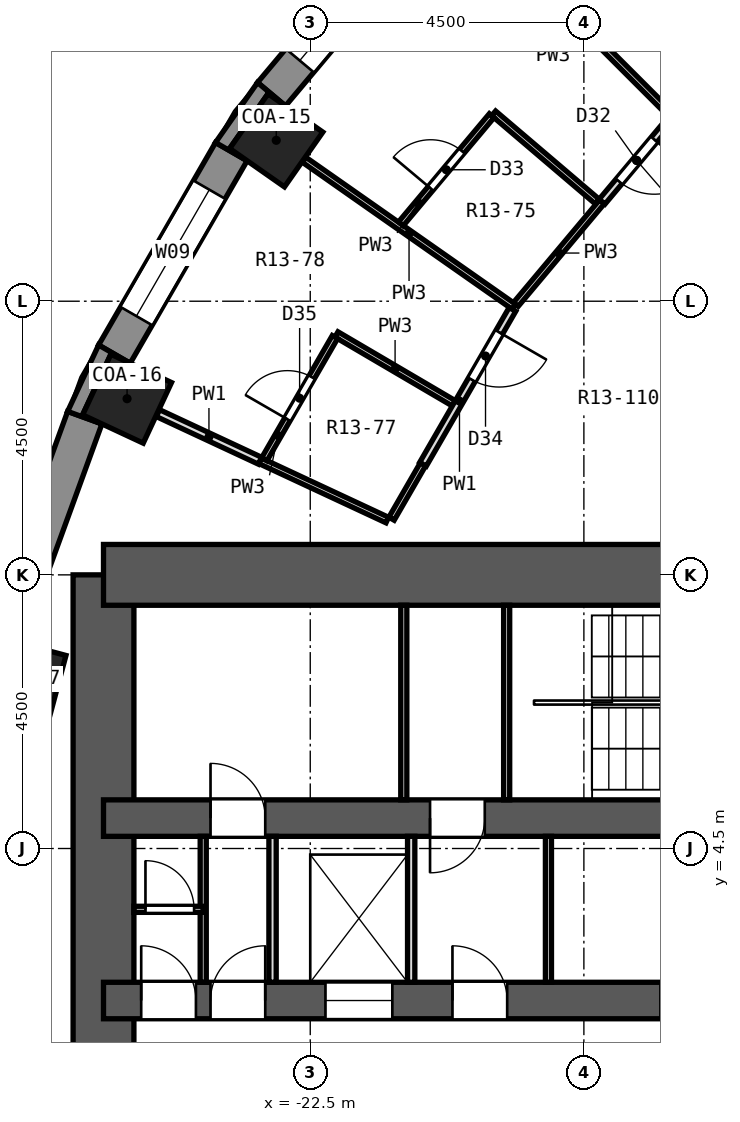
"""IFC4 building model, lengths in metres.
Left out: names, types, materials, properties, quantities, classifications, styles, units other than length and angle.
Written with IfcOpenShell. Run it as: python <this file> out.ifc"""

import sys

from ifc_helpers import new_model, si_unit, direction, frame, frame_2d, origin, origin_2d, place, context, subcontext, project, spatial, polyline, rectangle, outline, extrude, element, fill, save


model = new_model("IFC4")
c1 = context("Model", 3, precision=1e-05, world=origin(), true_north=direction((0.0, 1.0)))
c2 = subcontext(c1, "Body", "Model", "MODEL_VIEW")
j1 = project(units=[si_unit("LENGTHUNIT", "METRE"), si_unit("PLANEANGLEUNIT", "RADIAN")], contexts=[c1])
p1 = place(None, origin())
s1 = spatial("IfcSite", under=j1, at=p1, CompositionType="ELEMENT")
p2 = place(p1, origin())
s2 = spatial("IfcBuilding", under=s1, at=p2, CompositionType="ELEMENT")
p3 = place(p2, frame((0.0, 0.0, 65.9)))
s3 = spatial("IfcBuildingStorey", under=s2, at=p3, CompositionType="ELEMENT", Elevation=65.9)
for number, where, z_axis, x_axis in (
    (1, (-23.059, 16.146, 0.0), (0.0, 0.0, 1.0), (-0.819, 0.574, 0.0)),
    (2, (-25.512, 11.897, 0.0), (0.0, 0.0, 1.0), (-0.906, 0.423, 0.0)),
    (3, (-27.191, 7.286, 0.0), (0.0, 0.0, 1.0), (-0.966, 0.259, 0.0)),
):
    element("IfcColumn", number, at=place(p3, frame(where, z_axis=z_axis, x_axis=x_axis)), inside=s3, PredefinedType="COLUMN", context=c2, shape_type="SweptSolid", body=[
        extrude(rectangle(XDim=1.1, YDim=1.1, at=origin_2d()), origin(), (0.0, 0.0, 1.0), 3.3),
    ])
p4 = place(p3, frame((-25.9, -9.0, 0.0), z_axis=(0.0, 0.0, 1.0), x_axis=(0.0, 1.0, 0.0)))
e4 = element("IfcWall", 4, at=p4, inside=s3, PredefinedType="SHEAR", context=c2, shape_type="SweptSolid", body=[
    extrude(rectangle(XDim=18.0, YDim=1.0, at=frame_2d((9.0, 0.0))), origin(), (0.0, 0.0, 1.0), 3.3),
])
p5 = place(p3, frame((-13.5, 9.0, 0.0), z_axis=(0.0, 0.0, 1.0), x_axis=(-1.0, 0.0, 0.0)))
e5 = element("IfcWall", 5, at=p5, inside=s3, PredefinedType="SHEAR", context=c2, shape_type="SweptSolid", body=[
    extrude(rectangle(XDim=12.4, YDim=1.0, at=frame_2d((6.2, 0.0))), origin(), (0.0, 0.0, 1.0), 3.3),
])
p6 = place(p3, frame((-13.5, 5.0, 0.0), z_axis=(0.0, 0.0, 1.0), x_axis=(-1.0, 0.0, 0.0)))
e6 = element("IfcWall", 6, at=p6, inside=s3, PredefinedType="SHEAR", context=c2, shape_type="SweptSolid", body=[
    extrude(rectangle(XDim=12.4, YDim=0.6, at=frame_2d((6.2, 0.0))), origin(), (0.0, 0.0, 1.0), 3.3),
])
p7 = place(p6, frame((6.13, 0.0, 0.0)))
e7 = element("IfcOpeningElement", 7, at=p7, cuts=e6, PredefinedType="OPENING", context=c2, shape_type="SweptSolid", body=[
    extrude(rectangle(XDim=0.9, YDim=2.1, at=frame_2d((0.45, 1.05))), frame((0.0, 0.312, 0.0), z_axis=(0.0, -1.0, 0.0), x_axis=(1.0, 0.0, 0.0)), (0.0, 0.0, 1.0), 0.624),
])
p8 = place(p6, frame((9.74, 0.0, 0.0)))
e8 = element("IfcOpeningElement", 8, at=p8, cuts=e6, PredefinedType="OPENING", context=c2, shape_type="SweptSolid", body=[
    extrude(rectangle(XDim=0.9, YDim=2.1, at=frame_2d((0.45, 1.05))), frame((0.0, 0.312, 0.0), z_axis=(0.0, -1.0, 0.0), x_axis=(1.0, 0.0, 0.0)), (0.0, 0.0, 1.0), 0.624),
])
p9 = place(p3, frame((-13.5, 2.0, 0.0), z_axis=(0.0, 0.0, 1.0), x_axis=(-1.0, 0.0, 0.0)))
e9 = element("IfcWall", 9, at=p9, inside=s3, PredefinedType="SHEAR", context=c2, shape_type="SweptSolid", body=[
    extrude(rectangle(XDim=12.4, YDim=0.6, at=frame_2d((6.2, 0.0))), origin(), (0.0, 0.0, 1.0), 3.3),
])
p10 = place(p9, frame((7.65, 0.0, 0.0)))
e10 = element("IfcOpeningElement", 10, at=p10, cuts=e9, PredefinedType="OPENING", context=c2, shape_type="SweptSolid", body=[
    extrude(rectangle(XDim=1.1, YDim=2.1, at=frame_2d((0.55, 1.05))), frame((0.0, 0.312, 0.0), z_axis=(0.0, -1.0, 0.0), x_axis=(1.0, 0.0, 0.0)), (0.0, 0.0, 1.0), 0.624),
])
p11 = place(p9, frame((2.341, 0.0, 0.0)))
e11 = element("IfcOpeningElement", 11, at=p11, cuts=e9, PredefinedType="OPENING", context=c2, shape_type="SweptSolid", body=[
    extrude(rectangle(XDim=0.9, YDim=2.1, at=frame_2d((0.45, 1.05))), frame((0.0, 0.312, 0.0), z_axis=(0.0, -1.0, 0.0), x_axis=(1.0, 0.0, 0.0)), (0.0, 0.0, 1.0), 0.624),
])
p12 = place(p9, frame((5.761, 0.0, 0.0)))
e12 = element("IfcOpeningElement", 12, at=p12, cuts=e9, PredefinedType="OPENING", context=c2, shape_type="SweptSolid", body=[
    extrude(rectangle(XDim=0.9, YDim=2.1, at=frame_2d((0.45, 1.05))), frame((0.0, 0.312, 0.0), z_axis=(0.0, -1.0, 0.0), x_axis=(1.0, 0.0, 0.0)), (0.0, 0.0, 1.0), 0.624),
])
p13 = place(p9, frame((9.74, 0.0, 0.0)))
e13 = element("IfcOpeningElement", 13, at=p13, cuts=e9, PredefinedType="OPENING", context=c2, shape_type="SweptSolid", body=[
    extrude(rectangle(XDim=0.9, YDim=2.1, at=frame_2d((0.45, 1.05))), frame((0.0, 0.312, 0.0), z_axis=(0.0, -1.0, 0.0), x_axis=(1.0, 0.0, 0.0)), (0.0, 0.0, 1.0), 0.624),
])
p14 = place(p9, frame((10.88, 0.0, 0.0)))
e14 = element("IfcOpeningElement", 14, at=p14, cuts=e9, PredefinedType="OPENING", context=c2, shape_type="SweptSolid", body=[
    extrude(rectangle(XDim=0.9, YDim=2.1, at=frame_2d((0.45, 1.05))), frame((0.0, 0.312, 0.0), z_axis=(0.0, -1.0, 0.0), x_axis=(1.0, 0.0, 0.0)), (0.0, 0.0, 1.0), 0.624),
])
p15 = place(p3, frame((-20.665, 19.85, 0.0), z_axis=(0.0, 0.0, 1.0), x_axis=(-0.642809392687, -0.766026164483, 0.0)))
e15 = element("IfcWall", 15, at=p15, inside=s3, PredefinedType="SOLIDWALL", context=c2, shape_type="SweptSolid", body=[
    extrude(rectangle(XDim=3.846, YDim=0.6, at=frame_2d((1.923, 0.0))), origin(), (0.0, 0.0, 1.0), 2.75),
])
p16 = place(p15, frame((0.723, 0.0, 0.9)))
e16 = element("IfcOpeningElement", 16, at=p16, cuts=e15, PredefinedType="OPENING", context=c2, shape_type="SweptSolid", body=[
    extrude(rectangle(XDim=2.4, YDim=1.8, at=frame_2d((1.2, 0.9))), frame((0.0, 0.312, 0.0), z_axis=(0.0, -1.0, 0.0), x_axis=(1.0, 0.0, 0.0)), (0.0, 0.0, 1.0), 0.624),
])
p17 = place(p3, frame((-23.798, 15.96, 0.0), z_axis=(0.0, 0.0, 1.0), x_axis=(-0.499989888488, -0.86603124159, 0.0)))
e17 = element("IfcWall", 17, at=p17, inside=s3, PredefinedType="SOLIDWALL", context=c2, shape_type="SweptSolid", body=[
    extrude(rectangle(XDim=3.846, YDim=0.6, at=frame_2d((1.923, 0.0))), origin(), (0.0, 0.0, 1.0), 2.75),
])
p18 = place(p17, frame((0.723, 0.0, 0.9)))
e18 = element("IfcOpeningElement", 18, at=p18, cuts=e17, PredefinedType="OPENING", context=c2, shape_type="SweptSolid", body=[
    extrude(rectangle(XDim=2.4, YDim=1.8, at=frame_2d((1.2, 0.9))), frame((0.0, 0.312, 0.0), z_axis=(0.0, -1.0, 0.0), x_axis=(1.0, 0.0, 0.0)), (0.0, 0.0, 1.0), 0.624),
])
p19 = place(p3, frame((-26.208, 11.585, 0.0), z_axis=(0.0, 0.0, 1.0), x_axis=(-0.342028474173, -0.939689588564, 0.0)))
e19 = element("IfcWall", 19, at=p19, inside=s3, PredefinedType="SOLIDWALL", context=c2, shape_type="SweptSolid", body=[
    extrude(rectangle(XDim=3.846, YDim=0.6, at=frame_2d((1.923, 0.0))), origin(), (0.0, 0.0, 1.0), 2.75),
])
p20 = place(p3, origin())
e20 = element("IfcWall", 20, at=p20, inside=s3, PredefinedType="SOLIDWALL", context=c2, shape_type="SweptSolid", body=[
    extrude(outline(polyline([(-23.367, 17.097), (-24.058, 16.11), (-23.538, 15.81), (-23.825, 16.011), (-23.194, 16.912), (-22.907, 16.711), (-23.367, 17.097)])), origin(), (0.0, 0.0, 1.0), 2.75),
])
p21 = place(p3, origin())
e21 = element("IfcWall", 21, at=p21, inside=s3, PredefinedType="SOLIDWALL", context=c2, shape_type="SweptSolid", body=[
    extrude(outline(polyline([(-26.49, 11.688), (-25.926, 11.483), (-26.243, 11.631), (-25.779, 12.628), (-25.461, 12.479), (-25.981, 12.78), (-26.49, 11.688)])), origin(), (0.0, 0.0, 1.0), 2.75),
])
p22 = place(p3, frame((-19.509, 19.509, 0.0), z_axis=(0.0, 0.0, 1.0), x_axis=(0.707106781187, -0.707106781187, 0.0)))
e22 = element("IfcWall", 22, at=p22, inside=s3, PredefinedType="PARTITIONING", context=c2, shape_type="SweptSolid", body=[
    extrude(rectangle(XDim=4.212, YDim=0.1, at=frame_2d((2.106, 0.0))), origin(), (0.0, 0.0, 1.0), 2.75),
])
p23 = place(p3, frame((-19.484, 16.59, 0.0), z_axis=(0.0, 0.0, 1.0), x_axis=(0.761325032224, -0.648370415201, 0.0)))
e23 = element("IfcWall", 23, at=p23, inside=s3, PredefinedType="PARTITIONING", context=c2, shape_type="SweptSolid", body=[
    extrude(rectangle(XDim=2.237, YDim=0.1, at=frame_2d((1.119, 0.0))), origin(), (0.0, 0.0, 1.0), 2.75),
])
p24 = place(p3, frame((-22.6, 15.826, 0.0), z_axis=(0.0, 0.0, 1.0), x_axis=(0.818956755678, -0.573855236388, 0.0)))
e24 = element("IfcWall", 24, at=p24, inside=s3, PredefinedType="PARTITIONING", context=c2, shape_type="SweptSolid", body=[
    extrude(rectangle(XDim=4.211, YDim=0.1, at=frame_2d((2.106, 0.0))), origin(), (0.0, 0.0, 1.0), 2.75),
])
p25 = place(p3, frame((-22.069, 12.954, 0.0), z_axis=(0.0, 0.0, 1.0), x_axis=(0.862374352329, -0.506271149134, 0.0)))
e25 = element("IfcWall", 25, at=p25, inside=s3, PredefinedType="PARTITIONING", context=c2, shape_type="SweptSolid", body=[
    extrude(rectangle(XDim=2.237, YDim=0.1, at=frame_2d((1.119, 0.0))), origin(), (0.0, 0.0, 1.0), 2.75),
])
p26 = place(p3, frame((-23.326, 10.877, 0.0), z_axis=(0.0, 0.0, 1.0), x_axis=(0.906293839501, -0.42264817104, 0.0)))
e26 = element("IfcWall", 26, at=p26, inside=s3, PredefinedType="PARTITIONING", context=c2, shape_type="SweptSolid", body=[
    extrude(rectangle(XDim=2.309, YDim=0.1, at=frame_2d((1.155, 0.0))), origin(), (0.0, 0.0, 1.0), 2.75),
])
p27 = place(p3, frame((-25.005, 11.66, 0.0), z_axis=(0.0, 0.0, 1.0), x_axis=(0.906348054162, -0.422531897869, 0.0)))
e27 = element("IfcWall", 27, at=p27, inside=s3, PredefinedType="PARTITIONING", context=c2, shape_type="SweptSolid", body=[
    extrude(rectangle(XDim=1.853, YDim=0.125, at=frame_2d((0.926, 0.0))), origin(), (0.0, 0.0, 1.0), 2.75),
])
p28 = place(p3, frame((-19.119, 13.447, 0.0), z_axis=(0.0, 0.0, 1.0), x_axis=(0.642771526397, 0.766057938313, 0.0)))
e28 = element("IfcWall", 28, at=p28, inside=s3, PredefinedType="PARTITIONING", context=c2, shape_type="SweptSolid", body=[
    extrude(rectangle(XDim=2.206, YDim=0.1, at=frame_2d((1.103, 0.0))), origin(), (0.0, 0.0, 1.0), 2.75),
])
p29 = place(p3, frame((-17.701, 15.137, 0.0), z_axis=(0.0, 0.0, 1.0), x_axis=(0.642894375175, 0.765954843557, 0.0)))
e29 = element("IfcWall", 29, at=p29, inside=s3, PredefinedType="PARTITIONING", context=c2, shape_type="SweptSolid", body=[
    extrude(rectangle(XDim=1.77, YDim=0.125, at=frame_2d((0.885, 0.0))), origin(), (0.0, 0.0, 1.0), 2.75),
])
p30 = place(p29, frame((0.435, 0.0, 0.0)))
e30 = element("IfcOpeningElement", 30, at=p30, cuts=e29, PredefinedType="OPENING", context=c2, shape_type="SweptSolid", body=[
    extrude(rectangle(XDim=0.9, YDim=2.1, at=frame_2d((0.45, 1.05))), frame((0.0, 0.074, 0.0), z_axis=(0.0, -1.0, 0.0), x_axis=(1.0, 0.0, 0.0)), (0.0, 0.0, 1.0), 0.149),
])
p31 = place(p3, frame((-21.01, 14.772, 0.0), z_axis=(0.0, 0.0, 1.0), x_axis=(0.642898772456, 0.765951152734, 0.0)))
e31 = element("IfcWall", 31, at=p31, inside=s3, PredefinedType="PARTITIONING", context=c2, shape_type="SweptSolid", body=[
    extrude(rectangle(XDim=2.323, YDim=0.1, at=frame_2d((1.162, 0.0))), origin(), (0.0, 0.0, 1.0), 2.75),
])
p32 = place(p31, frame((0.762, 0.0, 0.0)))
e32 = element("IfcOpeningElement", 32, at=p32, cuts=e31, PredefinedType="OPENING", context=c2, shape_type="SweptSolid", body=[
    extrude(rectangle(XDim=0.8, YDim=2.1, at=frame_2d((0.4, 1.05))), frame((0.0, 0.062, 0.0), z_axis=(0.0, -1.0, 0.0), x_axis=(1.0, 0.0, 0.0)), (0.0, 0.0, 1.0), 0.124),
])
p33 = place(p3, frame((-21.163, 9.923, 0.0), z_axis=(0.0, 0.0, 1.0), x_axis=(0.499797427156, 0.866142327685, 0.0)))
e33 = element("IfcWall", 33, at=p33, inside=s3, PredefinedType="PARTITIONING", context=c2, shape_type="SweptSolid", body=[
    extrude(rectangle(XDim=1.034, YDim=0.1, at=frame_2d((0.517, 0.0))), origin(), (0.0, 0.0, 1.0), 2.75),
])
p34 = place(p3, frame((-20.646, 10.818, 0.0), z_axis=(0.0, 0.0, 1.0), x_axis=(0.500129612544, 0.865950559014, 0.0)))
e34 = element("IfcWall", 34, at=p34, inside=s3, PredefinedType="PARTITIONING", context=c2, shape_type="SweptSolid", body=[
    extrude(rectangle(XDim=2.941, YDim=0.125, at=frame_2d((1.471, 0.0))), origin(), (0.0, 0.0, 1.0), 2.75),
])
p35 = place(p34, frame((1.606, 0.0, 0.0)))
e35 = element("IfcOpeningElement", 35, at=p35, cuts=e34, PredefinedType="OPENING", context=c2, shape_type="SweptSolid", body=[
    extrude(rectangle(XDim=0.9, YDim=2.1, at=frame_2d((0.45, 1.05))), frame((0.0, 0.074, 0.0), z_axis=(0.0, -1.0, 0.0), x_axis=(1.0, 0.0, 0.0)), (0.0, 0.0, 1.0), 0.149),
])
p36 = place(p3, frame((-23.255, 10.901, 0.0), z_axis=(0.0, 0.0, 1.0), x_axis=(0.500223263977, 0.865896463889, 0.0)))
e36 = element("IfcWall", 36, at=p36, inside=s3, PredefinedType="PARTITIONING", context=c2, shape_type="SweptSolid", body=[
    extrude(rectangle(XDim=2.321, YDim=0.1, at=frame_2d((1.16, 0.0))), origin(), (0.0, 0.0, 1.0), 2.75),
])
p37 = place(p36, frame((0.759, 0.0, 0.0)))
e37 = element("IfcOpeningElement", 37, at=p37, cuts=e36, PredefinedType="OPENING", context=c2, shape_type="SweptSolid", body=[
    extrude(rectangle(XDim=0.8, YDim=2.1, at=frame_2d((0.4, 1.05))), frame((0.0, 0.062, 0.0), z_axis=(0.0, -1.0, 0.0), x_axis=(1.0, 0.0, 0.0)), (0.0, 0.0, 1.0), 0.124),
])
p38 = place(p3, frame((-18.583, 2.3, 0.0), z_axis=(0.0, 0.0, 1.0), x_axis=(0.0, 1.0, 0.0)))
e38 = element("IfcWall", 38, at=p38, inside=s3, PredefinedType="PARTITIONING", context=c2, shape_type="SweptSolid", body=[
    extrude(rectangle(XDim=2.4, YDim=0.1, at=frame_2d((1.2, 0.0))), origin(), (0.0, 0.0, 1.0), 2.75),
])
for number, where, z_axis, x_axis in (
    (39, (-20.84, 2.3, 0.0), (0.0, 0.0, 1.0), (0.0, 1.0, 0.0)),
    (40, (-23.12, 2.3, 0.0), (0.0, 0.0, 1.0), (0.0, 1.0, 0.0)),
):
    element("IfcWall", number, at=place(p3, frame(where, z_axis=z_axis, x_axis=x_axis)), inside=s3, PredefinedType="PARTITIONING", context=c2, shape_type="SweptSolid", body=[
        extrude(rectangle(XDim=2.4, YDim=0.12, at=frame_2d((1.2, 0.0))), origin(), (0.0, 0.0, 1.0), 2.75),
    ])
p39 = place(p3, frame((-24.26, 2.3, 0.0), z_axis=(0.0, 0.0, 1.0), x_axis=(0.0, 1.0, 0.0)))
e41 = element("IfcWall", 41, at=p39, inside=s3, PredefinedType="PARTITIONING", context=c2, shape_type="SweptSolid", body=[
    extrude(rectangle(XDim=2.4, YDim=0.1, at=frame_2d((1.2, 0.0))), origin(), (0.0, 0.0, 1.0), 2.75),
])
p40 = place(p3, frame((-24.26, 3.5, 0.0), z_axis=(0.0, 0.0, 1.0), x_axis=(-1.0, 0.0, 0.0)))
e42 = element("IfcWall", 42, at=p40, inside=s3, PredefinedType="PARTITIONING", context=c2, shape_type="SweptSolid", body=[
    extrude(rectangle(XDim=1.14, YDim=0.1, at=frame_2d((0.57, 0.0))), origin(), (0.0, 0.0, 1.0), 2.75),
])
p41 = place(p40, frame((0.15, 0.0, 0.0)))
e43 = element("IfcOpeningElement", 43, at=p41, cuts=e42, PredefinedType="OPENING", context=c2, shape_type="SweptSolid", body=[
    extrude(rectangle(XDim=0.8, YDim=2.1, at=frame_2d((0.4, 1.05))), frame((0.0, 0.062, 0.0), z_axis=(0.0, -1.0, 0.0), x_axis=(1.0, 0.0, 0.0)), (0.0, 0.0, 1.0), 0.124),
])
for number, where, z_axis, x_axis in (
    (44, (-19.27, 5.3, 0.0), (0.0, 0.0, 1.0), (0.0, 1.0, 0.0)),
    (45, (-20.962, 5.3, 0.0), (0.0, 0.0, 1.0), (0.0, 1.0, 0.0)),
):
    element("IfcWall", number, at=place(p3, frame(where, z_axis=z_axis, x_axis=x_axis)), inside=s3, PredefinedType="PARTITIONING", context=c2, shape_type="SweptSolid", body=[
        extrude(rectangle(XDim=3.2, YDim=0.1, at=frame_2d((1.6, 0.0))), origin(), (0.0, 0.0, 1.0), 2.75),
    ])
p42 = place(p16, origin())
e46 = element("IfcWindow", 46, at=p42, inside=s3, PartitioningType="SINGLE_PANEL", PredefinedType="WINDOW", context=c2, shape_type="SweptSolid", body=[
    extrude(rectangle(XDim=2.4, YDim=1.8, at=frame_2d((1.2, 0.9))), frame((0.0, 0.18, 0.0), z_axis=(0.0, -1.0, 0.0), x_axis=(1.0, 0.0, 0.0)), (0.0, 0.0, 1.0), 0.06),
])
fill(e16, e46)
p43 = place(p18, origin())
e47 = element("IfcWindow", 47, at=p43, inside=s3, PartitioningType="SINGLE_PANEL", PredefinedType="WINDOW", context=c2, shape_type="SweptSolid", body=[
    extrude(rectangle(XDim=2.4, YDim=1.8, at=frame_2d((1.2, 0.9))), frame((0.0, 0.18, 0.0), z_axis=(0.0, -1.0, 0.0), x_axis=(1.0, 0.0, 0.0)), (0.0, 0.0, 1.0), 0.06),
])
fill(e18, e47)
p44 = place(p30, frame((0.9, 0.0, 0.0), z_axis=(0.0, 0.0, 1.0), x_axis=(-1.0, 0.0, 0.0)))
e48 = element("IfcDoor", 48, at=p44, inside=s3, OperationType="SINGLE_SWING_LEFT", PredefinedType="DOOR", context=c2, shape_type="SweptSolid", body=[
    extrude(rectangle(XDim=0.9, YDim=2.1, at=frame_2d((0.45, 1.05))), frame((0.0, 0.025, 0.0), z_axis=(0.0, -1.0, 0.0), x_axis=(1.0, 0.0, 0.0)), (0.0, 0.0, 1.0), 0.05),
])
fill(e30, e48)
p45 = place(p32, origin())
e49 = element("IfcDoor", 49, at=p45, inside=s3, OperationType="SINGLE_SWING_LEFT", PredefinedType="DOOR", context=c2, shape_type="SweptSolid", body=[
    extrude(rectangle(XDim=0.8, YDim=2.1, at=frame_2d((0.4, 1.05))), frame((0.0, 0.025, 0.0), z_axis=(0.0, -1.0, 0.0), x_axis=(1.0, 0.0, 0.0)), (0.0, 0.0, 1.0), 0.05),
])
fill(e32, e49)
p46 = place(p35, frame((0.9, 0.0, 0.0), z_axis=(0.0, 0.0, 1.0), x_axis=(-1.0, 0.0, 0.0)))
e50 = element("IfcDoor", 50, at=p46, inside=s3, OperationType="SINGLE_SWING_LEFT", PredefinedType="DOOR", context=c2, shape_type="SweptSolid", body=[
    extrude(rectangle(XDim=0.9, YDim=2.1, at=frame_2d((0.45, 1.05))), frame((0.0, 0.025, 0.0), z_axis=(0.0, -1.0, 0.0), x_axis=(1.0, 0.0, 0.0)), (0.0, 0.0, 1.0), 0.05),
])
fill(e35, e50)
p47 = place(p37, origin())
e51 = element("IfcDoor", 51, at=p47, inside=s3, OperationType="SINGLE_SWING_LEFT", PredefinedType="DOOR", context=c2, shape_type="SweptSolid", body=[
    extrude(rectangle(XDim=0.8, YDim=2.1, at=frame_2d((0.4, 1.05))), frame((0.0, 0.025, 0.0), z_axis=(0.0, -1.0, 0.0), x_axis=(1.0, 0.0, 0.0)), (0.0, 0.0, 1.0), 0.05),
])
fill(e37, e51)
p48 = place(p10, origin())
e52 = element("IfcDoor", 52, at=p48, inside=s3, OperationType="DOUBLE_DOOR_SLIDING", PredefinedType="DOOR", context=c2, shape_type="SweptSolid", body=[
    extrude(rectangle(XDim=1.1, YDim=2.1, at=frame_2d((0.55, 1.05))), frame((0.0, 0.025, 0.0), z_axis=(0.0, -1.0, 0.0), x_axis=(1.0, 0.0, 0.0)), (0.0, 0.0, 1.0), 0.05),
])
fill(e10, e52)
p49 = place(p11, frame((0.9, 0.0, 0.0), z_axis=(0.0, 0.0, 1.0), x_axis=(-1.0, 0.0, 0.0)))
e53 = element("IfcDoor", 53, at=p49, inside=s3, OperationType="SINGLE_SWING_RIGHT", PredefinedType="DOOR", context=c2, shape_type="SweptSolid", body=[
    extrude(rectangle(XDim=0.9, YDim=2.1, at=frame_2d((0.45, 1.05))), frame((0.0, 0.025, 0.0), z_axis=(0.0, -1.0, 0.0), x_axis=(1.0, 0.0, 0.0)), (0.0, 0.0, 1.0), 0.05),
])
fill(e11, e53)
p50 = place(p12, frame((0.9, 0.0, 0.0), z_axis=(0.0, 0.0, 1.0), x_axis=(-1.0, 0.0, 0.0)))
e54 = element("IfcDoor", 54, at=p50, inside=s3, OperationType="SINGLE_SWING_LEFT", PredefinedType="DOOR", context=c2, shape_type="SweptSolid", body=[
    extrude(rectangle(XDim=0.9, YDim=2.1, at=frame_2d((0.45, 1.05))), frame((0.0, 0.025, 0.0), z_axis=(0.0, -1.0, 0.0), x_axis=(1.0, 0.0, 0.0)), (0.0, 0.0, 1.0), 0.05),
])
fill(e12, e54)
p51 = place(p13, frame((0.9, 0.0, 0.0), z_axis=(0.0, 0.0, 1.0), x_axis=(-1.0, 0.0, 0.0)))
e55 = element("IfcDoor", 55, at=p51, inside=s3, OperationType="SINGLE_SWING_RIGHT", PredefinedType="DOOR", context=c2, shape_type="SweptSolid", body=[
    extrude(rectangle(XDim=0.9, YDim=2.1, at=frame_2d((0.45, 1.05))), frame((0.0, 0.025, 0.0), z_axis=(0.0, -1.0, 0.0), x_axis=(1.0, 0.0, 0.0)), (0.0, 0.0, 1.0), 0.05),
])
fill(e13, e55)
p52 = place(p14, frame((0.9, 0.0, 0.0), z_axis=(0.0, 0.0, 1.0), x_axis=(-1.0, 0.0, 0.0)))
e56 = element("IfcDoor", 56, at=p52, inside=s3, OperationType="SINGLE_SWING_LEFT", PredefinedType="DOOR", context=c2, shape_type="SweptSolid", body=[
    extrude(rectangle(XDim=0.9, YDim=2.1, at=frame_2d((0.45, 1.05))), frame((0.0, 0.025, 0.0), z_axis=(0.0, -1.0, 0.0), x_axis=(1.0, 0.0, 0.0)), (0.0, 0.0, 1.0), 0.05),
])
fill(e14, e56)
p53 = place(p41, frame((0.8, 0.0, 0.0), z_axis=(0.0, 0.0, 1.0), x_axis=(-1.0, 0.0, 0.0)))
e57 = element("IfcDoor", 57, at=p53, inside=s3, OperationType="SINGLE_SWING_LEFT", PredefinedType="DOOR", context=c2, shape_type="SweptSolid", body=[
    extrude(rectangle(XDim=0.8, YDim=2.1, at=frame_2d((0.4, 1.05))), frame((0.0, 0.025, 0.0), z_axis=(0.0, -1.0, 0.0), x_axis=(1.0, 0.0, 0.0)), (0.0, 0.0, 1.0), 0.05),
])
fill(e43, e57)
p54 = place(p7, origin())
e58 = element("IfcDoor", 58, at=p54, inside=s3, OperationType="SINGLE_SWING_RIGHT", PredefinedType="DOOR", context=c2, shape_type="SweptSolid", body=[
    extrude(rectangle(XDim=0.9, YDim=2.1, at=frame_2d((0.45, 1.05))), frame((0.0, 0.025, 0.0), z_axis=(0.0, -1.0, 0.0), x_axis=(1.0, 0.0, 0.0)), (0.0, 0.0, 1.0), 0.05),
])
fill(e7, e58)
p55 = place(p8, frame((0.9, 0.0, 0.0), z_axis=(0.0, 0.0, 1.0), x_axis=(-1.0, 0.0, 0.0)))
e59 = element("IfcDoor", 59, at=p55, inside=s3, OperationType="SINGLE_SWING_LEFT", PredefinedType="DOOR", context=c2, shape_type="SweptSolid", body=[
    extrude(rectangle(XDim=0.9, YDim=2.1, at=frame_2d((0.45, 1.05))), frame((0.0, 0.025, 0.0), z_axis=(0.0, -1.0, 0.0), x_axis=(1.0, 0.0, 0.0)), (0.0, 0.0, 1.0), 0.05),
])
fill(e8, e59)
save(model, sys.argv[1])
